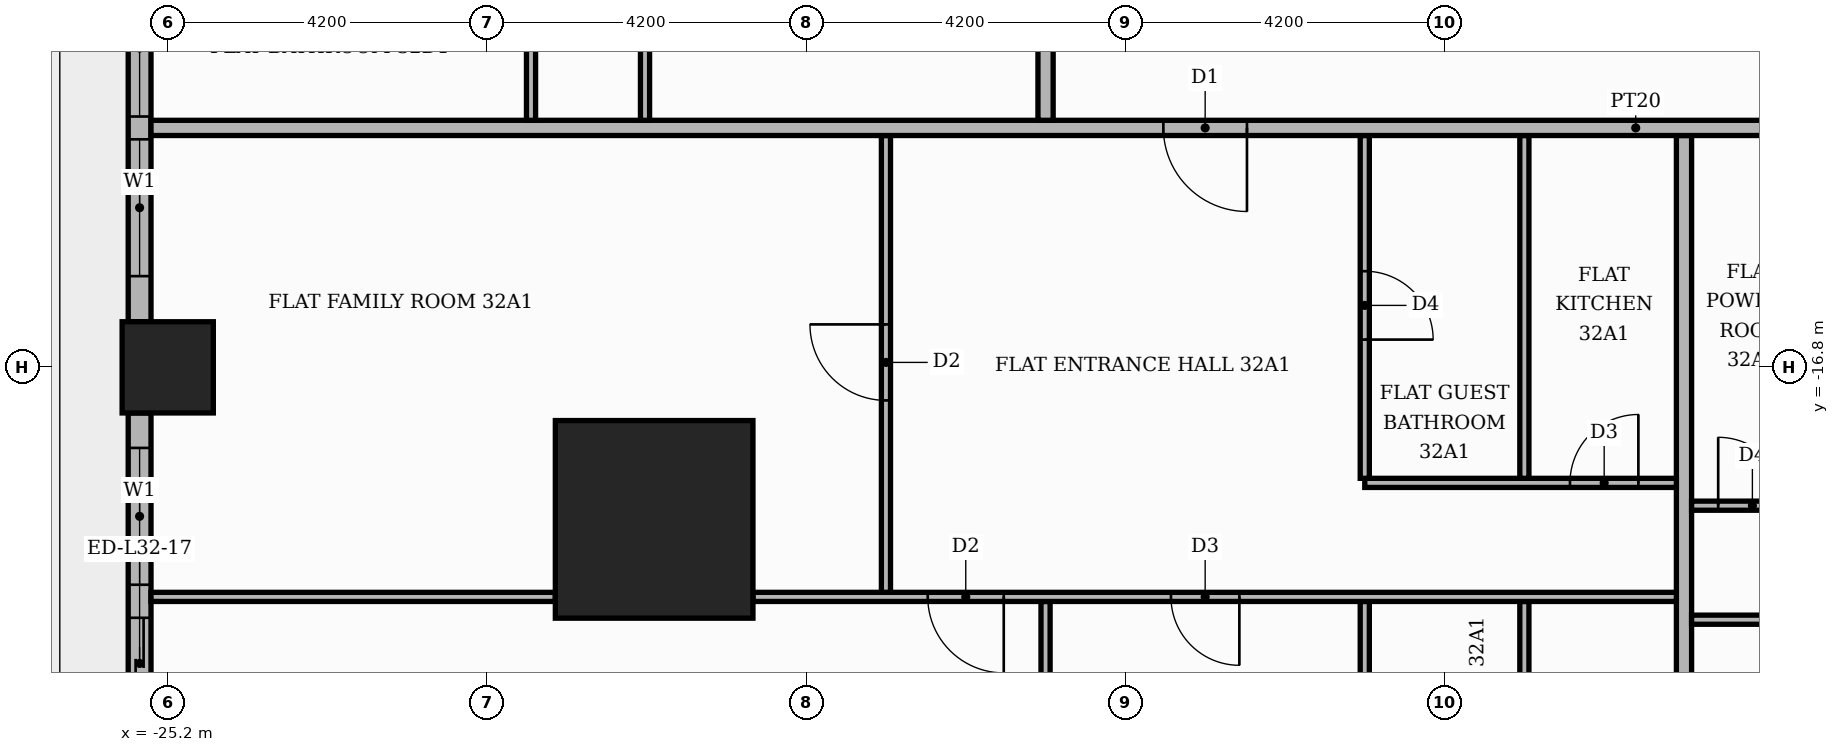
"""IFC4 building model, lengths in metres.
Left out: names, types, materials, properties, quantities, classifications, styles, units other than length and angle.
Written with IfcOpenShell. Run it as: python <this file> out.ifc"""

import sys

from ifc_helpers import new_model, si_unit, direction, frame, frame_2d, origin, origin_2d, place, context, subcontext, project, spatial, rectangle, extrude, element, fill, save


model = new_model("IFC4")
c1 = context("Model", 3, precision=1e-05, world=origin(), true_north=direction((0.0, 1.0)))
c2 = subcontext(c1, "Body", "Model", "MODEL_VIEW")
j1 = project(units=[si_unit("LENGTHUNIT", "METRE"), si_unit("PLANEANGLEUNIT", "RADIAN")], contexts=[c1])
p1 = place(None, origin())
s1 = spatial("IfcSite", under=j1, at=p1, CompositionType="ELEMENT")
p2 = place(p1, origin())
s2 = spatial("IfcBuilding", under=s1, at=p2, CompositionType="ELEMENT")
p3 = place(p2, frame((0.0, 0.0, 137.7)))
s3 = spatial("IfcBuildingStorey", under=s2, at=p3, CompositionType="ELEMENT", Elevation=137.7)
p4 = place(p3, frame((-18.8, -18.8, 0.0), z_axis=(0.0, 0.0, 1.0), x_axis=(1.0, 0.0, 0.0)))
e1 = element("IfcColumn", 1, at=p4, inside=s3, PredefinedType="COLUMN", context=c2, shape_type="SweptSolid", body=[
    extrude(rectangle(XDim=2.6, YDim=2.6, at=origin_2d()), origin(), (0.0, 0.0, 1.0), 3.9),
])
p5 = place(p3, frame((-25.2, -16.8, 0.0), z_axis=(0.0, 0.0, 1.0), x_axis=(1.0, 0.0, 0.0)))
e2 = element("IfcColumn", 2, at=p5, inside=s3, PredefinedType="COLUMN", context=c2, shape_type="SweptSolid", body=[
    extrude(rectangle(XDim=1.2, YDim=1.2, at=origin_2d()), origin(), (0.0, 0.0, 1.0), 3.9),
])
p6 = place(p3, frame((-25.57, -9.0, 0.0), z_axis=(0.0, 0.0, 1.0), x_axis=(0.0, -1.0, 0.0)))
e3 = element("IfcWall", 3, at=p6, inside=s3, PredefinedType="STANDARD", context=c2, shape_type="SweptSolid", body=[
    extrude(rectangle(XDim=7.2, YDim=0.3, at=frame_2d((3.6, 0.0))), origin(), (0.0, 0.0, 1.0), 3.48),
])
p7 = place(p6, frame((0.6, 0.0, 0.9)))
e4 = element("IfcOpeningElement", 4, at=p7, cuts=e3, PredefinedType="OPENING", context=c2, shape_type="SweptSolid", body=[
    extrude(rectangle(XDim=1.8, YDim=2.1, at=frame_2d((0.9, 1.05))), frame((0.0, 0.16, 0.0), z_axis=(0.0, -1.0, 0.0), x_axis=(1.0, 0.0, 0.0)), (0.0, 0.0, 1.0), 0.32),
])
p8 = place(p6, frame((2.7, 0.0, 0.9)))
e5 = element("IfcOpeningElement", 5, at=p8, cuts=e3, PredefinedType="OPENING", context=c2, shape_type="SweptSolid", body=[
    extrude(rectangle(XDim=1.8, YDim=2.1, at=frame_2d((0.9, 1.05))), frame((0.0, 0.16, 0.0), z_axis=(0.0, -1.0, 0.0), x_axis=(1.0, 0.0, 0.0)), (0.0, 0.0, 1.0), 0.32),
])
p9 = place(p6, frame((4.8, 0.0, 0.9)))
e6 = element("IfcOpeningElement", 6, at=p9, cuts=e3, PredefinedType="OPENING", context=c2, shape_type="SweptSolid", body=[
    extrude(rectangle(XDim=1.8, YDim=2.1, at=frame_2d((0.9, 1.05))), frame((0.0, 0.16, 0.0), z_axis=(0.0, -1.0, 0.0), x_axis=(1.0, 0.0, 0.0)), (0.0, 0.0, 1.0), 0.32),
])
p10 = place(p3, frame((-25.57, -17.4, 0.0), z_axis=(0.0, 0.0, 1.0), x_axis=(0.0, -1.0, 0.0)))
e7 = element("IfcWall", 7, at=p10, inside=s3, PredefinedType="STANDARD", context=c2, shape_type="SweptSolid", body=[
    extrude(rectangle(XDim=4.32, YDim=0.3, at=frame_2d((2.16, 0.0))), origin(), (0.0, 0.0, 1.0), 3.48),
])
p11 = place(p10, frame((2.695, 0.0, 0.0)))
e8 = element("IfcOpeningElement", 8, at=p11, cuts=e7, PredefinedType="OPENING", context=c2, shape_type="SweptSolid", body=[
    extrude(rectangle(XDim=1.2, YDim=2.4, at=frame_2d((0.6, 1.2))), frame((0.0, 0.16, 0.0), z_axis=(0.0, -1.0, 0.0), x_axis=(1.0, 0.0, 0.0)), (0.0, 0.0, 1.0), 0.32),
])
p12 = place(p10, frame((0.46, 0.0, 0.9)))
e9 = element("IfcOpeningElement", 9, at=p12, cuts=e7, PredefinedType="OPENING", context=c2, shape_type="SweptSolid", body=[
    extrude(rectangle(XDim=1.8, YDim=2.1, at=frame_2d((0.9, 1.05))), frame((0.0, 0.16, 0.0), z_axis=(0.0, -1.0, 0.0), x_axis=(1.0, 0.0, 0.0)), (0.0, 0.0, 1.0), 0.32),
])
p13 = place(p3, frame((-13.65, -25.42, 0.0), z_axis=(0.0, 0.0, 1.0), x_axis=(0.0, 1.0, 0.0)))
e10 = element("IfcWall", 10, at=p13, inside=s3, PredefinedType="PARTITIONING", context=c2, shape_type="SweptSolid", body=[
    extrude(rectangle(XDim=5.54, YDim=0.12, at=frame_2d((2.77, 0.0))), origin(), (0.0, 0.0, 1.0), 3.48),
])
p14 = place(p3, frame((-9.45, -25.42, 0.0), z_axis=(0.0, 0.0, 1.0), x_axis=(0.0, 1.0, 0.0)))
e11 = element("IfcWall", 11, at=p14, inside=s3, PredefinedType="PARTITIONING", context=c2, shape_type="SweptSolid", body=[
    extrude(rectangle(XDim=5.54, YDim=0.12, at=frame_2d((2.77, 0.0))), origin(), (0.0, 0.0, 1.0), 3.48),
])
p15 = place(p14, frame((2.2, 0.0, 0.0)))
e12 = element("IfcOpeningElement", 12, at=p15, cuts=e11, PredefinedType="OPENING", context=c2, shape_type="SweptSolid", body=[
    extrude(rectangle(XDim=0.9, YDim=2.1, at=frame_2d((0.45, 1.05))), frame((0.0, 0.07, 0.0), z_axis=(0.0, -1.0, 0.0), x_axis=(1.0, 0.0, 0.0)), (0.0, 0.0, 1.0), 0.14),
])
p16 = place(p3, frame((-7.35, -25.42, 0.0), z_axis=(0.0, 0.0, 1.0), x_axis=(0.0, 1.0, 0.0)))
e13 = element("IfcWall", 13, at=p16, inside=s3, PredefinedType="PARTITIONING", context=c2, shape_type="SweptSolid", body=[
    extrude(rectangle(XDim=5.54, YDim=0.12, at=frame_2d((2.77, 0.0))), origin(), (0.0, 0.0, 1.0), 3.48),
])
p17 = place(p16, frame((2.2, 0.0, 0.0)))
e14 = element("IfcOpeningElement", 14, at=p17, cuts=e13, PredefinedType="OPENING", context=c2, shape_type="SweptSolid", body=[
    extrude(rectangle(XDim=0.9, YDim=2.1, at=frame_2d((0.45, 1.05))), frame((0.0, 0.07, 0.0), z_axis=(0.0, -1.0, 0.0), x_axis=(1.0, 0.0, 0.0)), (0.0, 0.0, 1.0), 0.14),
])
p18 = place(p3, frame((-5.25, -25.42, 0.0), z_axis=(0.0, 0.0, 1.0), x_axis=(0.0, 1.0, 0.0)))
e15 = element("IfcWall", 15, at=p18, inside=s3, PredefinedType="PARTITIONING", context=c2, shape_type="SweptSolid", body=[
    extrude(rectangle(XDim=11.67, YDim=0.2, at=frame_2d((5.835, 0.0))), origin(), (0.0, 0.0, 1.0), 3.48),
])
p19 = place(p3, frame((-5.15, -20.12, 0.0), z_axis=(0.0, 0.0, 1.0), x_axis=(1.0, 0.0, 0.0)))
e16 = element("IfcWall", 16, at=p19, inside=s3, PredefinedType="PARTITIONING", context=c2, shape_type="SweptSolid", body=[
    extrude(rectangle(XDim=18.7, YDim=0.12, at=frame_2d((9.35, 0.0))), origin(), (0.0, 0.0, 1.0), 3.48),
])
p20 = place(p19, frame((2.55, 0.0, 0.0)))
e17 = element("IfcOpeningElement", 17, at=p20, cuts=e16, PredefinedType="OPENING", context=c2, shape_type="SweptSolid", body=[
    extrude(rectangle(XDim=1.0, YDim=2.1, at=frame_2d((0.5, 1.05))), frame((0.0, 0.07, 0.0), z_axis=(0.0, -1.0, 0.0), x_axis=(1.0, 0.0, 0.0)), (0.0, 0.0, 1.0), 0.14),
])
p21 = place(p19, frame((7.85, 0.0, 0.0)))
e18 = element("IfcOpeningElement", 18, at=p21, cuts=e16, PredefinedType="OPENING", context=c2, shape_type="SweptSolid", body=[
    extrude(rectangle(XDim=0.9, YDim=2.1, at=frame_2d((0.45, 1.05))), frame((0.0, 0.07, 0.0), z_axis=(0.0, -1.0, 0.0), x_axis=(1.0, 0.0, 0.0)), (0.0, 0.0, 1.0), 0.14),
])
p22 = place(p19, frame((16.25, 0.0, 0.0)))
e19 = element("IfcOpeningElement", 19, at=p22, cuts=e16, PredefinedType="OPENING", context=c2, shape_type="SweptSolid", body=[
    extrude(rectangle(XDim=0.9, YDim=2.1, at=frame_2d((0.45, 1.05))), frame((0.0, 0.07, 0.0), z_axis=(0.0, -1.0, 0.0), x_axis=(1.0, 0.0, 0.0)), (0.0, 0.0, 1.0), 0.14),
])
p23 = place(p3, frame((-25.42, -19.82, 0.0), z_axis=(0.0, 0.0, 1.0), x_axis=(1.0, 0.0, 0.0)))
e20 = element("IfcWall", 20, at=p23, inside=s3, PredefinedType="PARTITIONING", context=c2, shape_type="SweptSolid", body=[
    extrude(rectangle(XDim=5.32, YDim=0.12, at=frame_2d((2.66, 0.0))), origin(), (0.0, 0.0, 1.0), 3.48),
])
p24 = place(p3, frame((-17.5, -19.82, 0.0), z_axis=(0.0, 0.0, 1.0), x_axis=(1.0, 0.0, 0.0)))
e21 = element("IfcWall", 21, at=p24, inside=s3, PredefinedType="PARTITIONING", context=c2, shape_type="SweptSolid", body=[
    extrude(rectangle(XDim=12.15, YDim=0.12, at=frame_2d((6.075, 0.0))), origin(), (0.0, 0.0, 1.0), 3.48),
])
p25 = place(p24, frame((2.3, 0.0, 0.0)))
e22 = element("IfcOpeningElement", 22, at=p25, cuts=e21, PredefinedType="OPENING", context=c2, shape_type="SweptSolid", body=[
    extrude(rectangle(XDim=1.0, YDim=2.1, at=frame_2d((0.5, 1.05))), frame((0.0, 0.07, 0.0), z_axis=(0.0, -1.0, 0.0), x_axis=(1.0, 0.0, 0.0)), (0.0, 0.0, 1.0), 0.14),
])
p26 = place(p24, frame((5.5, 0.0, 0.0)))
e23 = element("IfcOpeningElement", 23, at=p26, cuts=e21, PredefinedType="OPENING", context=c2, shape_type="SweptSolid", body=[
    extrude(rectangle(XDim=0.9, YDim=2.1, at=frame_2d((0.45, 1.05))), frame((0.0, 0.07, 0.0), z_axis=(0.0, -1.0, 0.0), x_axis=(1.0, 0.0, 0.0)), (0.0, 0.0, 1.0), 0.14),
])
p27 = place(p3, frame((-15.75, -19.76, 0.0), z_axis=(0.0, 0.0, 1.0), x_axis=(0.0, 1.0, 0.0)))
e24 = element("IfcWall", 24, at=p27, inside=s3, PredefinedType="PARTITIONING", context=c2, shape_type="SweptSolid", body=[
    extrude(rectangle(XDim=6.01, YDim=0.12, at=frame_2d((3.005, 0.0))), origin(), (0.0, 0.0, 1.0), 3.48),
])
p28 = place(p27, frame((2.525, 0.0, 0.0)))
e25 = element("IfcOpeningElement", 25, at=p28, cuts=e24, PredefinedType="OPENING", context=c2, shape_type="SweptSolid", body=[
    extrude(rectangle(XDim=1.0, YDim=2.1, at=frame_2d((0.5, 1.05))), frame((0.0, 0.07, 0.0), z_axis=(0.0, -1.0, 0.0), x_axis=(1.0, 0.0, 0.0)), (0.0, 0.0, 1.0), 0.14),
])
p29 = place(p3, frame((-5.15, -18.62, 0.0), z_axis=(0.0, 0.0, 1.0), x_axis=(1.0, 0.0, 0.0)))
e26 = element("IfcWall", 26, at=p29, inside=s3, PredefinedType="PARTITIONING", context=c2, shape_type="SweptSolid", body=[
    extrude(rectangle(XDim=4.1, YDim=0.12, at=frame_2d((2.05, 0.0))), origin(), (0.0, 0.0, 1.0), 3.48),
])
p30 = place(p29, frame((0.35, 0.0, 0.0)))
e27 = element("IfcOpeningElement", 27, at=p30, cuts=e26, PredefinedType="OPENING", context=c2, shape_type="SweptSolid", body=[
    extrude(rectangle(XDim=0.9, YDim=2.1, at=frame_2d((0.45, 1.05))), frame((0.0, 0.07, 0.0), z_axis=(0.0, -1.0, 0.0), x_axis=(1.0, 0.0, 0.0)), (0.0, 0.0, 1.0), 0.14),
])
p31 = place(p3, frame((-9.45, -18.32, 0.0), z_axis=(0.0, 0.0, 1.0), x_axis=(1.0, 0.0, 0.0)))
e28 = element("IfcWall", 28, at=p31, inside=s3, PredefinedType="PARTITIONING", context=c2, shape_type="SweptSolid", body=[
    extrude(rectangle(XDim=4.1, YDim=0.12, at=frame_2d((2.05, 0.0))), origin(), (0.0, 0.0, 1.0), 3.48),
])
p32 = place(p31, frame((2.7, 0.0, 0.0)))
e29 = element("IfcOpeningElement", 29, at=p32, cuts=e28, PredefinedType="OPENING", context=c2, shape_type="SweptSolid", body=[
    extrude(rectangle(XDim=0.9, YDim=2.1, at=frame_2d((0.45, 1.05))), frame((0.0, 0.07, 0.0), z_axis=(0.0, -1.0, 0.0), x_axis=(1.0, 0.0, 0.0)), (0.0, 0.0, 1.0), 0.14),
])
p33 = place(p3, frame((-9.45, -18.26, 0.0), z_axis=(0.0, 0.0, 1.0), x_axis=(0.0, 1.0, 0.0)))
e30 = element("IfcWall", 30, at=p33, inside=s3, PredefinedType="PARTITIONING", context=c2, shape_type="SweptSolid", body=[
    extrude(rectangle(XDim=4.51, YDim=0.12, at=frame_2d((2.255, 0.0))), origin(), (0.0, 0.0, 1.0), 3.48),
])
p34 = place(p33, frame((1.825, 0.0, 0.0)))
e31 = element("IfcOpeningElement", 31, at=p34, cuts=e30, PredefinedType="OPENING", context=c2, shape_type="SweptSolid", body=[
    extrude(rectangle(XDim=0.9, YDim=2.1, at=frame_2d((0.45, 1.05))), frame((0.0, 0.07, 0.0), z_axis=(0.0, -1.0, 0.0), x_axis=(1.0, 0.0, 0.0)), (0.0, 0.0, 1.0), 0.14),
])
p35 = place(p3, frame((-7.35, -18.26, 0.0), z_axis=(0.0, 0.0, 1.0), x_axis=(0.0, 1.0, 0.0)))
e32 = element("IfcWall", 32, at=p35, inside=s3, PredefinedType="PARTITIONING", context=c2, shape_type="SweptSolid", body=[
    extrude(rectangle(XDim=4.51, YDim=0.12, at=frame_2d((2.255, 0.0))), origin(), (0.0, 0.0, 1.0), 3.48),
])
p36 = place(p3, frame((-25.42, -13.65, 0.0), z_axis=(0.0, 0.0, 1.0), x_axis=(1.0, 0.0, 0.0)))
e33 = element("IfcWall", 33, at=p36, inside=s3, PredefinedType="PARTITIONING", context=c2, shape_type="SweptSolid", body=[
    extrude(rectangle(XDim=39.07, YDim=0.2, at=frame_2d((19.535, 0.0))), origin(), (0.0, 0.0, 1.0), 3.48),
])
p37 = place(p36, frame((13.32, 0.0, 0.0)))
e34 = element("IfcOpeningElement", 34, at=p37, cuts=e33, PredefinedType="OPENING", context=c2, shape_type="SweptSolid", body=[
    extrude(rectangle(XDim=1.1, YDim=2.4, at=frame_2d((0.55, 1.2))), frame((0.0, 0.11, 0.0), z_axis=(0.0, -1.0, 0.0), x_axis=(1.0, 0.0, 0.0)), (0.0, 0.0, 1.0), 0.22),
])
p38 = place(p36, frame((25.92, 0.0, 0.0)))
e35 = element("IfcOpeningElement", 35, at=p38, cuts=e33, PredefinedType="OPENING", context=c2, shape_type="SweptSolid", body=[
    extrude(rectangle(XDim=1.1, YDim=2.4, at=frame_2d((0.55, 1.2))), frame((0.0, 0.11, 0.0), z_axis=(0.0, -1.0, 0.0), x_axis=(1.0, 0.0, 0.0)), (0.0, 0.0, 1.0), 0.22),
])
p39 = place(p3, frame((-20.42, -13.55, 0.0), z_axis=(0.0, 0.0, 1.0), x_axis=(0.0, 1.0, 0.0)))
e36 = element("IfcWall", 36, at=p39, inside=s3, PredefinedType="PARTITIONING", context=c2, shape_type="SweptSolid", body=[
    extrude(rectangle(XDim=1.94, YDim=0.12, at=frame_2d((0.97, 0.0))), origin(), (0.0, 0.0, 1.0), 3.48),
])
p40 = place(p3, frame((-18.92, -13.55, 0.0), z_axis=(0.0, 0.0, 1.0), x_axis=(0.0, 1.0, 0.0)))
e37 = element("IfcWall", 37, at=p40, inside=s3, PredefinedType="PARTITIONING", context=c2, shape_type="SweptSolid", body=[
    extrude(rectangle(XDim=4.04, YDim=0.12, at=frame_2d((2.02, 0.0))), origin(), (0.0, 0.0, 1.0), 3.48),
])
p41 = place(p40, frame((1.55, 0.0, 0.0)))
e38 = element("IfcOpeningElement", 38, at=p41, cuts=e37, PredefinedType="OPENING", context=c2, shape_type="SweptSolid", body=[
    extrude(rectangle(XDim=0.9, YDim=2.1, at=frame_2d((0.45, 1.05))), frame((0.0, 0.07, 0.0), z_axis=(0.0, -1.0, 0.0), x_axis=(1.0, 0.0, 0.0)), (0.0, 0.0, 1.0), 0.14),
])
p42 = place(p3, frame((-13.65, -13.55, 0.0), z_axis=(0.0, 0.0, 1.0), x_axis=(0.0, 1.0, 0.0)))
e39 = element("IfcWall", 39, at=p42, inside=s3, PredefinedType="PARTITIONING", context=c2, shape_type="SweptSolid", body=[
    extrude(rectangle(XDim=2.45, YDim=0.2, at=frame_2d((1.225, 0.0))), origin(), (0.0, 0.0, 1.0), 3.48),
])
p43 = place(p8, origin())
e40 = element("IfcWindow", 40, at=p43, inside=s3, PartitioningType="SINGLE_PANEL", PredefinedType="WINDOW", context=c2, shape_type="SweptSolid", body=[
    extrude(rectangle(XDim=1.8, YDim=2.1, at=frame_2d((0.9, 1.05))), frame((0.0, 0.03, 0.0), z_axis=(0.0, -1.0, 0.0), x_axis=(1.0, 0.0, 0.0)), (0.0, 0.0, 1.0), 0.06),
])
fill(e5, e40)
p44 = place(p9, origin())
e41 = element("IfcWindow", 41, at=p44, inside=s3, PartitioningType="SINGLE_PANEL", PredefinedType="WINDOW", context=c2, shape_type="SweptSolid", body=[
    extrude(rectangle(XDim=1.8, YDim=2.1, at=frame_2d((0.9, 1.05))), frame((0.0, 0.03, 0.0), z_axis=(0.0, -1.0, 0.0), x_axis=(1.0, 0.0, 0.0)), (0.0, 0.0, 1.0), 0.06),
])
fill(e6, e41)
p45 = place(p11, origin())
e42 = element("IfcDoor", 42, at=p45, inside=s3, OperationType="SLIDING_TO_LEFT", PredefinedType="DOOR", context=c2, shape_type="SweptSolid", body=[
    extrude(rectangle(XDim=1.2, YDim=2.4, at=frame_2d((0.6, 1.2))), frame((0.0, 0.025, 0.0), z_axis=(0.0, -1.0, 0.0), x_axis=(1.0, 0.0, 0.0)), (0.0, 0.0, 1.0), 0.05),
])
fill(e8, e42)
p46 = place(p12, origin())
e43 = element("IfcWindow", 43, at=p46, inside=s3, PartitioningType="SINGLE_PANEL", PredefinedType="WINDOW", context=c2, shape_type="SweptSolid", body=[
    extrude(rectangle(XDim=1.8, YDim=2.1, at=frame_2d((0.9, 1.05))), frame((0.0, 0.03, 0.0), z_axis=(0.0, -1.0, 0.0), x_axis=(1.0, 0.0, 0.0)), (0.0, 0.0, 1.0), 0.06),
])
fill(e9, e43)
p47 = place(p37, frame((1.1, 0.0, 0.0), z_axis=(0.0, 0.0, 1.0), x_axis=(-1.0, 0.0, 0.0)))
e44 = element("IfcDoor", 44, at=p47, inside=s3, OperationType="SINGLE_SWING_RIGHT", PredefinedType="DOOR", context=c2, shape_type="SweptSolid", body=[
    extrude(rectangle(XDim=1.1, YDim=2.4, at=frame_2d((0.55, 1.2))), frame((0.0, 0.025, 0.0), z_axis=(0.0, -1.0, 0.0), x_axis=(1.0, 0.0, 0.0)), (0.0, 0.0, 1.0), 0.05),
])
fill(e34, e44)
p48 = place(p28, origin())
e45 = element("IfcDoor", 45, at=p48, inside=s3, OperationType="SINGLE_SWING_RIGHT", PredefinedType="DOOR", context=c2, shape_type="SweptSolid", body=[
    extrude(rectangle(XDim=1.0, YDim=2.1, at=frame_2d((0.5, 1.05))), frame((0.0, 0.025, 0.0), z_axis=(0.0, -1.0, 0.0), x_axis=(1.0, 0.0, 0.0)), (0.0, 0.0, 1.0), 0.05),
])
fill(e25, e45)
p49 = place(p34, frame((0.9, 0.0, 0.0), z_axis=(0.0, 0.0, 1.0), x_axis=(-1.0, 0.0, 0.0)))
e46 = element("IfcDoor", 46, at=p49, inside=s3, OperationType="SINGLE_SWING_LEFT", PredefinedType="DOOR", context=c2, shape_type="SweptSolid", body=[
    extrude(rectangle(XDim=0.9, YDim=2.1, at=frame_2d((0.45, 1.05))), frame((0.0, 0.025, 0.0), z_axis=(0.0, -1.0, 0.0), x_axis=(1.0, 0.0, 0.0)), (0.0, 0.0, 1.0), 0.05),
])
fill(e31, e46)
p50 = place(p32, origin())
e47 = element("IfcDoor", 47, at=p50, inside=s3, OperationType="SINGLE_SWING_RIGHT", PredefinedType="DOOR", context=c2, shape_type="SweptSolid", body=[
    extrude(rectangle(XDim=0.9, YDim=2.1, at=frame_2d((0.45, 1.05))), frame((0.0, 0.025, 0.0), z_axis=(0.0, -1.0, 0.0), x_axis=(1.0, 0.0, 0.0)), (0.0, 0.0, 1.0), 0.05),
])
fill(e29, e47)
p51 = place(p25, frame((1.0, 0.0, 0.0), z_axis=(0.0, 0.0, 1.0), x_axis=(-1.0, 0.0, 0.0)))
e48 = element("IfcDoor", 48, at=p51, inside=s3, OperationType="SINGLE_SWING_RIGHT", PredefinedType="DOOR", context=c2, shape_type="SweptSolid", body=[
    extrude(rectangle(XDim=1.0, YDim=2.1, at=frame_2d((0.5, 1.05))), frame((0.0, 0.025, 0.0), z_axis=(0.0, -1.0, 0.0), x_axis=(1.0, 0.0, 0.0)), (0.0, 0.0, 1.0), 0.05),
])
fill(e22, e48)
p52 = place(p26, frame((0.9, 0.0, 0.0), z_axis=(0.0, 0.0, 1.0), x_axis=(-1.0, 0.0, 0.0)))
e49 = element("IfcDoor", 49, at=p52, inside=s3, OperationType="SINGLE_SWING_RIGHT", PredefinedType="DOOR", context=c2, shape_type="SweptSolid", body=[
    extrude(rectangle(XDim=0.9, YDim=2.1, at=frame_2d((0.45, 1.05))), frame((0.0, 0.025, 0.0), z_axis=(0.0, -1.0, 0.0), x_axis=(1.0, 0.0, 0.0)), (0.0, 0.0, 1.0), 0.05),
])
fill(e23, e49)
p53 = place(p30, origin())
e50 = element("IfcDoor", 50, at=p53, inside=s3, OperationType="SINGLE_SWING_LEFT", PredefinedType="DOOR", context=c2, shape_type="SweptSolid", body=[
    extrude(rectangle(XDim=0.9, YDim=2.1, at=frame_2d((0.45, 1.05))), frame((0.0, 0.025, 0.0), z_axis=(0.0, -1.0, 0.0), x_axis=(1.0, 0.0, 0.0)), (0.0, 0.0, 1.0), 0.05),
])
fill(e27, e50)
save(model, sys.argv[1])
